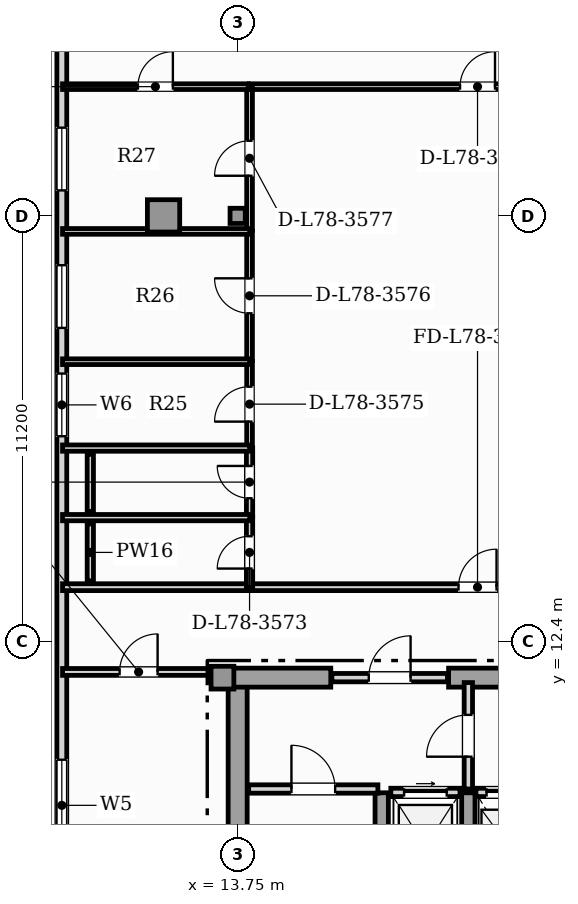
"""IFC4 building model, lengths in metres.
Left out: names, types, materials, properties, quantities, classifications, styles, units other than length and angle.
Written with IfcOpenShell. Run it as: python <this file> out.ifc"""

import sys

from ifc_helpers import new_model, si_unit, direction, frame, frame_2d, origin, origin_2d, place, context, subcontext, project, spatial, rectangle, hollow_rectangle, extrude, element, fill, save


model = new_model("IFC4")
c1 = context("Model", 3, precision=1e-05, world=origin(), true_north=direction((0.0, 1.0)))
c2 = subcontext(c1, "Body", "Model", "MODEL_VIEW")
j1 = project(units=[si_unit("LENGTHUNIT", "METRE"), si_unit("PLANEANGLEUNIT", "RADIAN")], contexts=[c1])
p1 = place(None, origin())
s1 = spatial("IfcSite", under=j1, at=p1, CompositionType="ELEMENT")
p2 = place(p1, origin())
s2 = spatial("IfcBuilding", under=s1, at=p2, CompositionType="ELEMENT")
p3 = place(p2, frame((0.0, 0.0, 316.9)))
s3 = spatial("IfcBuildingStorey", under=s2, at=p3, CompositionType="ELEMENT", Elevation=316.9)
p4 = place(p3, frame((13.75, 0.92, 0.0), z_axis=(0.0, 0.0, 1.0), x_axis=(0.0, 1.0, 0.0)))
e1 = element("IfcWall", 1, at=p4, inside=s3, PredefinedType="SHEAR", context=c2, shape_type="SweptSolid", body=[
    extrude(rectangle(XDim=10.53, YDim=0.5, at=frame_2d((5.265, 0.0))), origin(), (0.0, 0.0, 1.0), 3.65),
])
p5 = place(p3, frame((13.25, 11.45, 0.0), z_axis=(0.0, 0.0, 1.0), x_axis=(1.0, 0.0, 0.0)))
e2 = element("IfcWall", 2, at=p5, inside=s3, PredefinedType="SHEAR", context=c2, shape_type="SweptSolid", body=[
    extrude(rectangle(XDim=2.95, YDim=0.5, at=frame_2d((1.475, 0.0))), origin(), (0.0, 0.0, 1.0), 3.65),
])
p6 = place(p3, frame((19.3, 11.45, 0.0), z_axis=(0.0, 0.0, 1.0), x_axis=(1.0, 0.0, 0.0)))
e3 = element("IfcWall", 3, at=p6, inside=s3, PredefinedType="SHEAR", context=c2, shape_type="SweptSolid", body=[
    extrude(rectangle(XDim=7.3, YDim=0.5, at=frame_2d((3.65, 0.0))), origin(), (0.0, 0.0, 1.0), 3.65),
])
for number, where, z_axis, x_axis in (
    (4, (17.54, 0.92, 0.0), (0.0, 0.0, 1.0), (0.0, 1.0, 0.0)),
    (5, (19.82, 0.92, 0.0), (0.0, 0.0, 1.0), (0.0, 1.0, 0.0)),
):
    element("IfcWall", number, at=place(p3, frame(where, z_axis=z_axis, x_axis=x_axis)), inside=s3, PredefinedType="SHEAR", context=c2, shape_type="SweptSolid", body=[
        extrude(rectangle(XDim=7.5, YDim=0.35, at=frame_2d((3.75, 0.0))), origin(), (0.0, 0.0, 1.0), 3.65),
    ])
p7 = place(p3, frame((13.35, 11.45, 0.0), z_axis=(0.0, 0.0, 1.0), x_axis=(1.0, 0.0, 0.0)))
e6 = element("IfcColumn", 6, at=p7, inside=s3, PredefinedType="COLUMN", context=c2, shape_type="SweptSolid", body=[
    extrude(rectangle(XDim=0.6, YDim=0.6, at=origin_2d()), origin(), (0.0, 0.0, 1.0), 3.85),
])
p8 = place(p3, frame((11.8, 23.6, 0.0), z_axis=(0.0, 0.0, 1.0), x_axis=(1.0, 0.0, 0.0)))
e7 = element("IfcColumn", 7, at=p8, inside=s3, PredefinedType="USERDEFINED", context=c2, shape_type="SweptSolid", body=[
    extrude(hollow_rectangle(XDim=0.85, YDim=0.85, WallThickness=0.05, at=origin_2d()), origin(), (0.0, 0.0, 1.0), 3.85),
])
p9 = place(p3, frame((13.75, 23.6, 0.0), z_axis=(0.0, 0.0, 1.0), x_axis=(1.0, 0.0, 0.0)))
e8 = element("IfcColumn", 8, at=p9, inside=s3, PredefinedType="COLUMN", context=c2, shape_type="SweptSolid", body=[
    extrude(hollow_rectangle(XDim=0.4, YDim=0.4, WallThickness=0.02, at=origin_2d()), origin(), (0.0, 0.0, 1.0), 3.85),
])
p10 = place(p3, frame((9.123, 29.642, 0.0), z_axis=(0.0, 0.0, 1.0), x_axis=(0.0, -1.0, 0.0)))
e9 = element("IfcWall", 9, at=p10, inside=s3, PredefinedType="SOLIDWALL", context=c2, shape_type="SweptSolid", body=[
    extrude(rectangle(XDim=26.402, YDim=0.26, at=frame_2d((13.201, 0.0))), origin(), (0.0, 0.0, 1.0), 3.65),
])
p11 = place(p10, frame((20.352, 0.0, 0.85)))
e10 = element("IfcOpeningElement", 10, at=p11, cuts=e9, PredefinedType="OPENING", context=c2, shape_type="SweptSolid", body=[
    extrude(rectangle(XDim=2.4, YDim=2.0, at=frame_2d((1.2, 1.0))), frame((0.0, 0.14, 0.0), z_axis=(0.0, -1.0, 0.0), x_axis=(1.0, 0.0, 0.0)), (0.0, 0.0, 1.0), 0.28),
])
p12 = place(p10, frame((10.19, 0.0, 0.88)))
e11 = element("IfcOpeningElement", 11, at=p12, cuts=e9, PredefinedType="OPENING", context=c2, shape_type="SweptSolid", body=[
    extrude(rectangle(XDim=1.65, YDim=2.0, at=frame_2d((0.825, 1.0))), frame((0.0, 0.14, 0.0), z_axis=(0.0, -1.0, 0.0), x_axis=(1.0, 0.0, 0.0)), (0.0, 0.0, 1.0), 0.28),
])
p13 = place(p10, frame((7.34, 0.0, 0.88)))
e12 = element("IfcOpeningElement", 12, at=p13, cuts=e9, PredefinedType="OPENING", context=c2, shape_type="SweptSolid", body=[
    extrude(rectangle(XDim=1.65, YDim=2.0, at=frame_2d((0.825, 1.0))), frame((0.0, 0.14, 0.0), z_axis=(0.0, -1.0, 0.0), x_axis=(1.0, 0.0, 0.0)), (0.0, 0.0, 1.0), 0.28),
])
p14 = place(p10, frame((3.721, 0.0, 0.88)))
e13 = element("IfcOpeningElement", 13, at=p14, cuts=e9, PredefinedType="OPENING", context=c2, shape_type="SweptSolid", body=[
    extrude(rectangle(XDim=1.65, YDim=2.0, at=frame_2d((0.825, 1.0))), frame((0.0, 0.14, 0.0), z_axis=(0.0, -1.0, 0.0), x_axis=(1.0, 0.0, 0.0)), (0.0, 0.0, 1.0), 0.28),
])
p15 = place(p3, frame((17.78, 8.43, 0.0), z_axis=(0.0, 0.0, 1.0), x_axis=(1.0, 0.0, 0.0)))
e14 = element("IfcWall", 14, at=p15, inside=s3, PredefinedType="SOLIDWALL", context=c2, shape_type="SweptSolid", body=[
    extrude(rectangle(XDim=1.82, YDim=0.22, at=frame_2d((0.91, 0.0))), origin(), (0.0, 0.0, 1.0), 3.65),
])
p16 = place(p15, frame((0.35, 0.0, 0.0)))
e15 = element("IfcOpeningElement", 15, at=p16, cuts=e14, PredefinedType="OPENING", context=c2, shape_type="SweptSolid", body=[
    extrude(rectangle(XDim=1.12, YDim=2.25, at=frame_2d((0.56, 1.125))), frame((0.0, 0.12, 0.0), z_axis=(0.0, -1.0, 0.0), x_axis=(1.0, 0.0, 0.0)), (0.0, 0.0, 1.0), 0.24),
])
p17 = place(p3, frame((20.02, 8.43, 0.0), z_axis=(0.0, 0.0, 1.0), x_axis=(1.0, 0.0, 0.0)))
e16 = element("IfcWall", 16, at=p17, inside=s3, PredefinedType="SOLIDWALL", context=c2, shape_type="SweptSolid", body=[
    extrude(rectangle(XDim=1.74, YDim=0.22, at=frame_2d((0.87, 0.0))), origin(), (0.0, 0.0, 1.0), 3.65),
])
p18 = place(p17, frame((0.28, 0.0, 0.0)))
e17 = element("IfcOpeningElement", 17, at=p18, cuts=e16, PredefinedType="OPENING", context=c2, shape_type="SweptSolid", body=[
    extrude(rectangle(XDim=1.18, YDim=2.2, at=frame_2d((0.59, 1.1))), frame((0.0, 0.12, 0.0), z_axis=(0.0, -1.0, 0.0), x_axis=(1.0, 0.0, 0.0)), (0.0, 0.0, 1.0), 0.24),
])
p19 = place(p3, frame((14.04, 8.52, 0.0), z_axis=(0.0, 0.0, 1.0), x_axis=(1.0, 0.0, 0.0)))
e18 = element("IfcWall", 18, at=p19, inside=s3, PredefinedType="SOLIDWALL", context=c2, shape_type="SweptSolid", body=[
    extrude(rectangle(XDim=3.4, YDim=0.22, at=frame_2d((1.7, 0.0))), origin(), (0.0, 0.0, 1.0), 3.65),
])
p20 = place(p19, frame((1.125, 0.0, 0.0)))
e19 = element("IfcOpeningElement", 19, at=p20, cuts=e18, PredefinedType="OPENING", context=c2, shape_type="SweptSolid", body=[
    extrude(rectangle(XDim=1.15, YDim=2.2, at=frame_2d((0.575, 1.1))), frame((0.0, 0.12, 0.0), z_axis=(0.0, -1.0, 0.0), x_axis=(1.0, 0.0, 0.0)), (0.0, 0.0, 1.0), 0.24),
])
p21 = place(p3, frame((19.82, 8.52, 0.0), z_axis=(0.0, 0.0, 1.0), x_axis=(0.0, 1.0, 0.0)))
e20 = element("IfcWall", 20, at=p21, inside=s3, PredefinedType="SOLIDWALL", context=c2, shape_type="SweptSolid", body=[
    extrude(rectangle(XDim=2.8, YDim=0.22, at=frame_2d((1.4, 0.0))), origin(), (0.0, 0.0, 1.0), 3.106),
])
p22 = place(p21, frame((0.85, 0.0, 0.0)))
e21 = element("IfcOpeningElement", 21, at=p22, cuts=e20, PredefinedType="OPENING", context=c2, shape_type="SweptSolid", body=[
    extrude(rectangle(XDim=1.1, YDim=2.2, at=frame_2d((0.55, 1.1))), frame((0.0, 0.12, 0.0), z_axis=(0.0, -1.0, 0.0), x_axis=(1.0, 0.0, 0.0)), (0.0, 0.0, 1.0), 0.24),
])
p23 = place(p3, frame((16.23, 11.45, 0.0), z_axis=(0.0, 0.0, 1.0), x_axis=(1.0, 0.0, 0.0)))
e22 = element("IfcWall", 22, at=p23, inside=s3, PredefinedType="SOLIDWALL", context=c2, shape_type="SweptSolid", body=[
    extrude(rectangle(XDim=3.04, YDim=0.22, at=frame_2d((1.52, 0.0))), origin(), (0.0, 0.0, 1.0), 3.65),
])
p24 = place(p23, frame((0.97, 0.0, 0.0)))
e23 = element("IfcOpeningElement", 23, at=p24, cuts=e22, PredefinedType="OPENING", context=c2, shape_type="SweptSolid", body=[
    extrude(rectangle(XDim=1.1, YDim=2.2, at=frame_2d((0.55, 1.1))), frame((0.0, 0.12, 0.0), z_axis=(0.0, -1.0, 0.0), x_axis=(1.0, 0.0, 0.0)), (0.0, 0.0, 1.0), 0.24),
])
p25 = place(p3, frame((9.143, 11.6, 0.0), z_axis=(0.0, 0.0, 1.0), x_axis=(1.0, 0.0, 0.0)))
e24 = element("IfcWall", 24, at=p25, inside=s3, PredefinedType="PARTITIONING", context=c2, shape_type="SweptSolid", body=[
    extrude(rectangle(XDim=4.002, YDim=0.18, at=frame_2d((2.001, 0.0))), origin(), (0.0, 0.0, 1.0), 3.65),
])
p26 = place(p25, frame((1.501, 0.0, 0.0)))
e25 = element("IfcOpeningElement", 25, at=p26, cuts=e24, PredefinedType="OPENING", context=c2, shape_type="SweptSolid", body=[
    extrude(rectangle(XDim=1.0, YDim=2.15, at=frame_2d((0.5, 1.075))), frame((0.0, 0.1, 0.0), z_axis=(0.0, -1.0, 0.0), x_axis=(1.0, 0.0, 0.0)), (0.0, 0.0, 1.0), 0.2),
])
p27 = place(p3, frame((14.058, 13.83, 0.0), z_axis=(0.0, 0.0, 1.0), x_axis=(1.0, 0.0, 0.0)))
e26 = element("IfcWall", 26, at=p27, inside=s3, PredefinedType="PARTITIONING", context=c2, shape_type="SweptSolid", body=[
    extrude(rectangle(XDim=12.007, YDim=0.18, at=frame_2d((6.003, 0.0))), origin(), (0.0, 0.0, 1.0), 3.65),
])
p28 = place(p27, frame((5.503, 0.0, 0.0)))
e27 = element("IfcOpeningElement", 27, at=p28, cuts=e26, PredefinedType="OPENING", context=c2, shape_type="SweptSolid", body=[
    extrude(rectangle(XDim=1.0, YDim=2.15, at=frame_2d((0.5, 1.075))), frame((0.0, 0.1, 0.0), z_axis=(0.0, -1.0, 0.0), x_axis=(1.0, 0.0, 0.0)), (0.0, 0.0, 1.0), 0.2),
])
p29 = place(p3, frame((9.143, 13.83, 0.0), z_axis=(0.0, 0.0, 1.0), x_axis=(1.0, 0.0, 0.0)))
e28 = element("IfcWall", 28, at=p29, inside=s3, PredefinedType="PARTITIONING", context=c2, shape_type="SweptSolid", body=[
    extrude(rectangle(XDim=4.885, YDim=0.18, at=frame_2d((2.443, 0.0))), origin(), (0.0, 0.0, 1.0), 3.65),
])
p30 = place(p3, frame((14.058, 27.0, 0.0), z_axis=(0.0, 0.0, 1.0), x_axis=(1.0, 0.0, 0.0)))
e29 = element("IfcWall", 29, at=p30, inside=s3, PredefinedType="PARTITIONING", context=c2, shape_type="SweptSolid", body=[
    extrude(rectangle(XDim=12.007, YDim=0.15, at=frame_2d((6.003, 0.0))), origin(), (0.0, 0.0, 1.0), 3.65),
])
p31 = place(p30, frame((5.543, 0.0, 0.0)))
e30 = element("IfcOpeningElement", 30, at=p31, cuts=e29, PredefinedType="OPENING", context=c2, shape_type="SweptSolid", body=[
    extrude(rectangle(XDim=0.92, YDim=2.1, at=frame_2d((0.46, 1.05))), frame((0.0, 0.085, 0.0), z_axis=(0.0, -1.0, 0.0), x_axis=(1.0, 0.0, 0.0)), (0.0, 0.0, 1.0), 0.17),
])
p32 = place(p3, frame((14.063, 13.825, 0.0), z_axis=(0.0, 0.0, 1.0), x_axis=(0.0, 1.0, 0.0)))
e31 = element("IfcWall", 31, at=p32, inside=s3, PredefinedType="PLUMBINGWALL", context=c2, shape_type="SweptSolid", body=[
    extrude(rectangle(XDim=1.84, YDim=0.165, at=frame_2d((0.92, 0.0))), origin(), (0.0, 0.0, 1.0), 3.65),
])
p33 = place(p32, frame((0.495, 0.0, 0.0)))
e32 = element("IfcOpeningElement", 32, at=p33, cuts=e31, PredefinedType="OPENING", context=c2, shape_type="SweptSolid", body=[
    extrude(rectangle(XDim=0.85, YDim=2.1, at=frame_2d((0.425, 1.05))), frame((0.0, 0.093, 0.0), z_axis=(0.0, -1.0, 0.0), x_axis=(1.0, 0.0, 0.0)), (0.0, 0.0, 1.0), 0.185),
])
p34 = place(p3, frame((14.063, 15.695, 0.0), z_axis=(0.0, 0.0, 1.0), x_axis=(0.0, 1.0, 0.0)))
e33 = element("IfcWall", 33, at=p34, inside=s3, PredefinedType="PLUMBINGWALL", context=c2, shape_type="SweptSolid", body=[
    extrude(rectangle(XDim=1.8, YDim=0.165, at=frame_2d((0.9, 0.0))), origin(), (0.0, 0.0, 1.0), 3.65),
])
p35 = place(p34, frame((0.475, 0.0, 0.0)))
e34 = element("IfcOpeningElement", 34, at=p35, cuts=e33, PredefinedType="OPENING", context=c2, shape_type="SweptSolid", body=[
    extrude(rectangle(XDim=0.85, YDim=2.1, at=frame_2d((0.425, 1.05))), frame((0.0, 0.093, 0.0), z_axis=(0.0, -1.0, 0.0), x_axis=(1.0, 0.0, 0.0)), (0.0, 0.0, 1.0), 0.185),
])
p36 = place(p3, frame((14.063, 17.525, 0.0), z_axis=(0.0, 0.0, 1.0), x_axis=(0.0, 1.0, 0.0)))
e35 = element("IfcWall", 35, at=p36, inside=s3, PredefinedType="PARTITIONING", context=c2, shape_type="SweptSolid", body=[
    extrude(rectangle(XDim=2.243, YDim=0.15, at=frame_2d((1.122, 0.0))), origin(), (0.0, 0.0, 1.0), 3.65),
])
p37 = place(p36, frame((0.661, 0.0, 0.0)))
e36 = element("IfcOpeningElement", 36, at=p37, cuts=e35, PredefinedType="OPENING", context=c2, shape_type="SweptSolid", body=[
    extrude(rectangle(XDim=0.92, YDim=2.1, at=frame_2d((0.46, 1.05))), frame((0.0, 0.085, 0.0), z_axis=(0.0, -1.0, 0.0), x_axis=(1.0, 0.0, 0.0)), (0.0, 0.0, 1.0), 0.17),
])
p38 = place(p3, frame((14.063, 19.798, 0.0), z_axis=(0.0, 0.0, 1.0), x_axis=(0.0, 1.0, 0.0)))
e37 = element("IfcWall", 37, at=p38, inside=s3, PredefinedType="PARTITIONING", context=c2, shape_type="SweptSolid", body=[
    extrude(rectangle(XDim=3.398, YDim=0.15, at=frame_2d((1.699, 0.0))), origin(), (0.0, 0.0, 1.0), 3.65),
])
p39 = place(p38, frame((1.239, 0.0, 0.0)))
e38 = element("IfcOpeningElement", 38, at=p39, cuts=e37, PredefinedType="OPENING", context=c2, shape_type="SweptSolid", body=[
    extrude(rectangle(XDim=0.92, YDim=2.1, at=frame_2d((0.46, 1.05))), frame((0.0, 0.085, 0.0), z_axis=(0.0, -1.0, 0.0), x_axis=(1.0, 0.0, 0.0)), (0.0, 0.0, 1.0), 0.17),
])
p40 = place(p3, frame((14.063, 23.226, 0.0), z_axis=(0.0, 0.0, 1.0), x_axis=(0.0, 1.0, 0.0)))
e39 = element("IfcWall", 39, at=p40, inside=s3, PredefinedType="PARTITIONING", context=c2, shape_type="SweptSolid", body=[
    extrude(rectangle(XDim=3.779, YDim=0.15, at=frame_2d((1.889, 0.0))), origin(), (0.0, 0.0, 1.0), 3.65),
])
p41 = place(p40, frame((1.429, 0.0, 0.0)))
e40 = element("IfcOpeningElement", 40, at=p41, cuts=e39, PredefinedType="OPENING", context=c2, shape_type="SweptSolid", body=[
    extrude(rectangle(XDim=0.92, YDim=2.1, at=frame_2d((0.46, 1.05))), frame((0.0, 0.085, 0.0), z_axis=(0.0, -1.0, 0.0), x_axis=(1.0, 0.0, 0.0)), (0.0, 0.0, 1.0), 0.17),
])
p42 = place(p3, frame((9.143, 27.0, 0.0), z_axis=(0.0, 0.0, 1.0), x_axis=(1.0, 0.0, 0.0)))
e41 = element("IfcWall", 41, at=p42, inside=s3, PredefinedType="PARTITIONING", context=c2, shape_type="SweptSolid", body=[
    extrude(rectangle(XDim=4.885, YDim=0.15, at=frame_2d((2.443, 0.0))), origin(), (0.0, 0.0, 1.0), 3.65),
])
p43 = place(p42, frame((1.983, 0.0, 0.0)))
e42 = element("IfcOpeningElement", 42, at=p43, cuts=e41, PredefinedType="OPENING", context=c2, shape_type="SweptSolid", body=[
    extrude(rectangle(XDim=0.92, YDim=2.1, at=frame_2d((0.46, 1.05))), frame((0.0, 0.085, 0.0), z_axis=(0.0, -1.0, 0.0), x_axis=(1.0, 0.0, 0.0)), (0.0, 0.0, 1.0), 0.17),
])
for number, where, z_axis, x_axis in (
    (43, (9.143, 15.66, 0.0), (0.0, 0.0, 1.0), (1.0, 0.0, 0.0)),
    (44, (9.143, 17.49, 0.0), (0.0, 0.0, 1.0), (1.0, 0.0, 0.0)),
):
    element("IfcWall", number, at=place(p3, frame(where, z_axis=z_axis, x_axis=x_axis)), inside=s3, PredefinedType="PLUMBINGWALL", context=c2, shape_type="SweptSolid", body=[
        extrude(rectangle(XDim=4.926, YDim=0.165, at=frame_2d((2.463, 0.0))), origin(), (0.0, 0.0, 1.0), 3.65),
    ])
for number, where, z_axis, x_axis in (
    (45, (9.143, 19.763, 0.0), (0.0, 0.0, 1.0), (1.0, 0.0, 0.0)),
    (46, (9.143, 23.191, 0.0), (0.0, 0.0, 1.0), (1.0, 0.0, 0.0)),
):
    element("IfcWall", number, at=place(p3, frame(where, z_axis=z_axis, x_axis=x_axis)), inside=s3, PredefinedType="PARTITIONING", context=c2, shape_type="SweptSolid", body=[
        extrude(rectangle(XDim=4.926, YDim=0.15, at=frame_2d((2.463, 0.0))), origin(), (0.0, 0.0, 1.0), 3.65),
    ])
for number, where, z_axis, x_axis in (
    (47, (9.873, 13.995, 0.0), (0.0, 0.0, 1.0), (0.0, 1.0, 0.0)),
    (48, (9.873, 15.825, 0.0), (0.0, 0.0, 1.0), (0.0, 1.0, 0.0)),
):
    element("IfcWall", number, at=place(p3, frame(where, z_axis=z_axis, x_axis=x_axis)), inside=s3, PredefinedType="PLUMBINGWALL", context=c2, shape_type="SweptSolid", body=[
        extrude(rectangle(XDim=1.5, YDim=0.165, at=frame_2d((0.75, 0.0))), origin(), (0.0, 0.0, 1.0), 3.65),
    ])
p44 = place(p11, origin())
e49 = element("IfcWindow", 49, at=p44, inside=s3, PartitioningType="SINGLE_PANEL", PredefinedType="WINDOW", context=c2, shape_type="SweptSolid", body=[
    extrude(rectangle(XDim=2.4, YDim=2.0, at=frame_2d((1.2, 1.0))), frame((0.0, 0.03, 0.0), z_axis=(0.0, -1.0, 0.0), x_axis=(1.0, 0.0, 0.0)), (0.0, 0.0, 1.0), 0.06),
])
fill(e10, e49)
p45 = place(p12, origin())
e50 = element("IfcWindow", 50, at=p45, inside=s3, PartitioningType="SINGLE_PANEL", PredefinedType="WINDOW", context=c2, shape_type="SweptSolid", body=[
    extrude(rectangle(XDim=1.65, YDim=2.0, at=frame_2d((0.825, 1.0))), frame((0.0, 0.03, 0.0), z_axis=(0.0, -1.0, 0.0), x_axis=(1.0, 0.0, 0.0)), (0.0, 0.0, 1.0), 0.06),
])
fill(e11, e50)
p46 = place(p13, origin())
e51 = element("IfcWindow", 51, at=p46, inside=s3, PartitioningType="SINGLE_PANEL", PredefinedType="WINDOW", context=c2, shape_type="SweptSolid", body=[
    extrude(rectangle(XDim=1.65, YDim=2.0, at=frame_2d((0.825, 1.0))), frame((0.0, 0.03, 0.0), z_axis=(0.0, -1.0, 0.0), x_axis=(1.0, 0.0, 0.0)), (0.0, 0.0, 1.0), 0.06),
])
fill(e12, e51)
p47 = place(p14, origin())
e52 = element("IfcWindow", 52, at=p47, inside=s3, PartitioningType="SINGLE_PANEL", PredefinedType="WINDOW", context=c2, shape_type="SweptSolid", body=[
    extrude(rectangle(XDim=1.65, YDim=2.0, at=frame_2d((0.825, 1.0))), frame((0.0, 0.03, 0.0), z_axis=(0.0, -1.0, 0.0), x_axis=(1.0, 0.0, 0.0)), (0.0, 0.0, 1.0), 0.06),
])
fill(e13, e52)
p48 = place(p16, origin())
e53 = element("IfcDoor", 53, at=p48, inside=s3, OperationType="SLIDING_TO_RIGHT", PredefinedType="DOOR", context=c2, shape_type="SweptSolid", body=[
    extrude(rectangle(XDim=1.12, YDim=2.25, at=frame_2d((0.56, 1.125))), frame((0.0, 0.025, 0.0), z_axis=(0.0, -1.0, 0.0), x_axis=(1.0, 0.0, 0.0)), (0.0, 0.0, 1.0), 0.05),
])
fill(e15, e53)
p49 = place(p18, origin())
e54 = element("IfcDoor", 54, at=p49, inside=s3, OperationType="SLIDING_TO_LEFT", PredefinedType="DOOR", context=c2, shape_type="SweptSolid", body=[
    extrude(rectangle(XDim=1.18, YDim=2.2, at=frame_2d((0.59, 1.1))), frame((0.0, 0.025, 0.0), z_axis=(0.0, -1.0, 0.0), x_axis=(1.0, 0.0, 0.0)), (0.0, 0.0, 1.0), 0.05),
])
fill(e17, e54)
p50 = place(p20, origin())
e55 = element("IfcDoor", 55, at=p50, inside=s3, OperationType="SINGLE_SWING_LEFT", PredefinedType="DOOR", context=c2, shape_type="SweptSolid", body=[
    extrude(rectangle(XDim=1.15, YDim=2.2, at=frame_2d((0.575, 1.1))), frame((0.0, 0.025, 0.0), z_axis=(0.0, -1.0, 0.0), x_axis=(1.0, 0.0, 0.0)), (0.0, 0.0, 1.0), 0.05),
])
fill(e19, e55)
p51 = place(p22, origin())
e56 = element("IfcDoor", 56, at=p51, inside=s3, OperationType="SINGLE_SWING_LEFT", PredefinedType="DOOR", context=c2, shape_type="SweptSolid", body=[
    extrude(rectangle(XDim=1.1, YDim=2.2, at=frame_2d((0.55, 1.1))), frame((0.0, 0.025, 0.0), z_axis=(0.0, -1.0, 0.0), x_axis=(1.0, 0.0, 0.0)), (0.0, 0.0, 1.0), 0.05),
])
fill(e21, e56)
p52 = place(p24, origin())
e57 = element("IfcDoor", 57, at=p52, inside=s3, OperationType="SINGLE_SWING_RIGHT", PredefinedType="DOOR", context=c2, shape_type="SweptSolid", body=[
    extrude(rectangle(XDim=1.1, YDim=2.2, at=frame_2d((0.55, 1.1))), frame((0.0, 0.025, 0.0), z_axis=(0.0, -1.0, 0.0), x_axis=(1.0, 0.0, 0.0)), (0.0, 0.0, 1.0), 0.05),
])
fill(e23, e57)
p53 = place(p26, origin())
e58 = element("IfcDoor", 58, at=p53, inside=s3, OperationType="SINGLE_SWING_RIGHT", PredefinedType="DOOR", context=c2, shape_type="SweptSolid", body=[
    extrude(rectangle(XDim=1.0, YDim=2.15, at=frame_2d((0.5, 1.075))), frame((0.0, 0.025, 0.0), z_axis=(0.0, -1.0, 0.0), x_axis=(1.0, 0.0, 0.0)), (0.0, 0.0, 1.0), 0.05),
])
fill(e25, e58)
p54 = place(p28, origin())
e59 = element("IfcDoor", 59, at=p54, inside=s3, OperationType="SINGLE_SWING_RIGHT", PredefinedType="DOOR", context=c2, shape_type="SweptSolid", body=[
    extrude(rectangle(XDim=1.0, YDim=2.15, at=frame_2d((0.5, 1.075))), frame((0.0, 0.025, 0.0), z_axis=(0.0, -1.0, 0.0), x_axis=(1.0, 0.0, 0.0)), (0.0, 0.0, 1.0), 0.05),
])
fill(e27, e59)
p55 = place(p31, origin())
e60 = element("IfcDoor", 60, at=p55, inside=s3, OperationType="SINGLE_SWING_RIGHT", PredefinedType="DOOR", context=c2, shape_type="SweptSolid", body=[
    extrude(rectangle(XDim=0.92, YDim=2.1, at=frame_2d((0.46, 1.05))), frame((0.0, 0.025, 0.0), z_axis=(0.0, -1.0, 0.0), x_axis=(1.0, 0.0, 0.0)), (0.0, 0.0, 1.0), 0.05),
])
fill(e30, e60)
p56 = place(p33, origin())
e61 = element("IfcDoor", 61, at=p56, inside=s3, OperationType="SINGLE_SWING_LEFT", PredefinedType="DOOR", context=c2, shape_type="SweptSolid", body=[
    extrude(rectangle(XDim=0.85, YDim=2.1, at=frame_2d((0.425, 1.05))), frame((0.0, 0.025, 0.0), z_axis=(0.0, -1.0, 0.0), x_axis=(1.0, 0.0, 0.0)), (0.0, 0.0, 1.0), 0.05),
])
fill(e32, e61)
p57 = place(p35, origin())
e62 = element("IfcDoor", 62, at=p57, inside=s3, OperationType="SINGLE_SWING_RIGHT", PredefinedType="DOOR", context=c2, shape_type="SweptSolid", body=[
    extrude(rectangle(XDim=0.85, YDim=2.1, at=frame_2d((0.425, 1.05))), frame((0.0, 0.025, 0.0), z_axis=(0.0, -1.0, 0.0), x_axis=(1.0, 0.0, 0.0)), (0.0, 0.0, 1.0), 0.05),
])
fill(e34, e62)
p58 = place(p37, origin())
e63 = element("IfcDoor", 63, at=p58, inside=s3, OperationType="SINGLE_SWING_LEFT", PredefinedType="DOOR", context=c2, shape_type="SweptSolid", body=[
    extrude(rectangle(XDim=0.92, YDim=2.1, at=frame_2d((0.46, 1.05))), frame((0.0, 0.025, 0.0), z_axis=(0.0, -1.0, 0.0), x_axis=(1.0, 0.0, 0.0)), (0.0, 0.0, 1.0), 0.05),
])
fill(e36, e63)
p59 = place(p39, origin())
e64 = element("IfcDoor", 64, at=p59, inside=s3, OperationType="SINGLE_SWING_RIGHT", PredefinedType="DOOR", context=c2, shape_type="SweptSolid", body=[
    extrude(rectangle(XDim=0.92, YDim=2.1, at=frame_2d((0.46, 1.05))), frame((0.0, 0.025, 0.0), z_axis=(0.0, -1.0, 0.0), x_axis=(1.0, 0.0, 0.0)), (0.0, 0.0, 1.0), 0.05),
])
fill(e38, e64)
p60 = place(p41, origin())
e65 = element("IfcDoor", 65, at=p60, inside=s3, OperationType="SINGLE_SWING_LEFT", PredefinedType="DOOR", context=c2, shape_type="SweptSolid", body=[
    extrude(rectangle(XDim=0.92, YDim=2.1, at=frame_2d((0.46, 1.05))), frame((0.0, 0.025, 0.0), z_axis=(0.0, -1.0, 0.0), x_axis=(1.0, 0.0, 0.0)), (0.0, 0.0, 1.0), 0.05),
])
fill(e40, e65)
p61 = place(p43, origin())
e66 = element("IfcDoor", 66, at=p61, inside=s3, OperationType="SINGLE_SWING_RIGHT", PredefinedType="DOOR", context=c2, shape_type="SweptSolid", body=[
    extrude(rectangle(XDim=0.92, YDim=2.1, at=frame_2d((0.46, 1.05))), frame((0.0, 0.025, 0.0), z_axis=(0.0, -1.0, 0.0), x_axis=(1.0, 0.0, 0.0)), (0.0, 0.0, 1.0), 0.05),
])
fill(e42, e66)
save(model, sys.argv[1])
